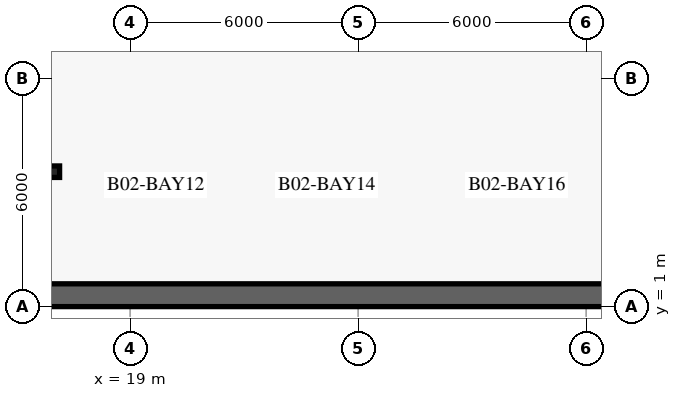
"""IFC4 building model, lengths in metres.
Left out: names, types, materials, properties, quantities, classifications, styles, units other than length and angle.
Written with IfcOpenShell. Run it as: python <this file> out.ifc"""

import sys

from ifc_helpers import new_model, si_unit, direction, frame, frame_2d, origin, place, context, subcontext, project, spatial, rectangle, extrude, element, save


model = new_model("IFC4")
c1 = context("Model", 3, precision=1e-05, world=origin(), true_north=direction((0.0, 1.0)))
c2 = subcontext(c1, "Body", "Model", "MODEL_VIEW")
j1 = project(units=[si_unit("LENGTHUNIT", "METRE"), si_unit("PLANEANGLEUNIT", "RADIAN")], contexts=[c1])
p1 = place(None, origin())
s1 = spatial("IfcSite", under=j1, at=p1, CompositionType="ELEMENT")
p2 = place(p1, origin())
s2 = spatial("IfcBuilding", under=s1, at=p2, CompositionType="ELEMENT")
p3 = place(p2, frame((0.0, 0.0, -8.4)))
s3 = spatial("IfcBuildingStorey", under=s2, at=p3, CompositionType="ELEMENT", Elevation=-8.4)
p4 = place(p3, frame((1.0, 1.3, 0.0), z_axis=(0.0, 0.0, 1.0), x_axis=(1.0, 0.0, 0.0)))
e1 = element("IfcWall", 1, at=p4, inside=s3, PredefinedType="USERDEFINED", context=c2, shape_type="SweptSolid", body=[
    extrude(rectangle(XDim=74.0, YDim=0.6, at=frame_2d((37.0, 0.0))), origin(), (0.0, 0.0, 1.0), 3.88),
])
save(model, sys.argv[1])
